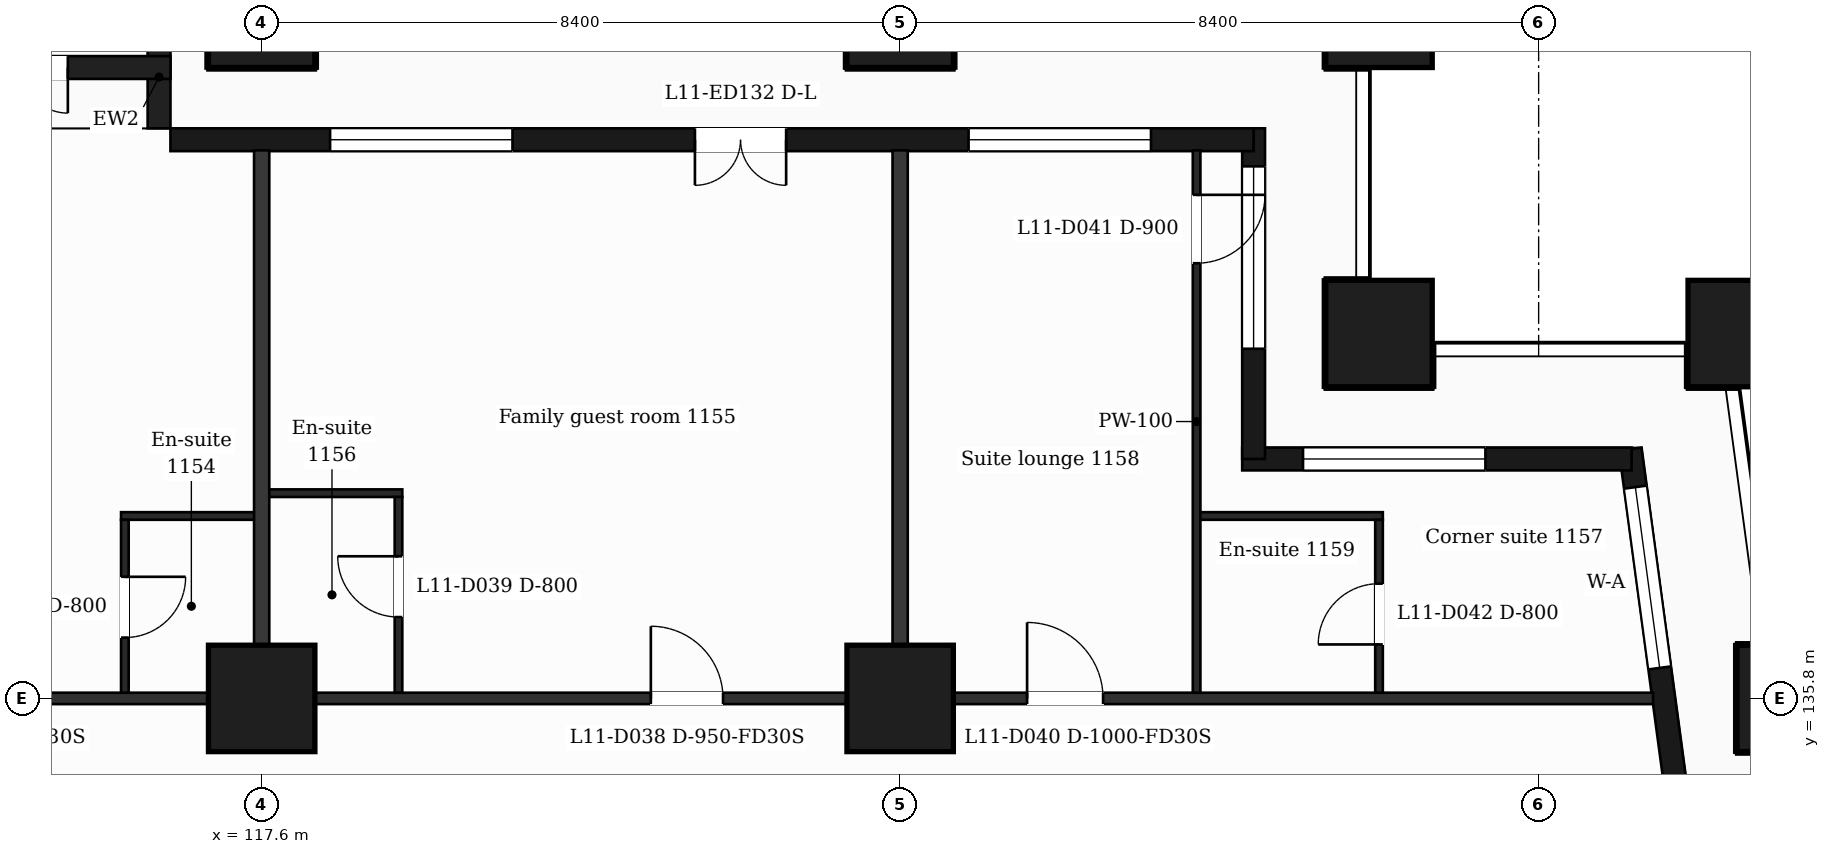
"""IFC4 building model, lengths in metres.
Left out: names, types, materials, properties, quantities, classifications, styles, units other than length and angle.
Written with IfcOpenShell. Run it as: python <this file> out.ifc"""

import sys

from ifc_helpers import new_model, si_unit, direction, frame, frame_2d, origin, origin_2d, place, context, subcontext, project, spatial, rectangle, extrude, element, fill, save


model = new_model("IFC4")
c1 = context("Model", 3, precision=1e-05, world=origin(), true_north=direction((0.0, 1.0)))
c2 = subcontext(c1, "Body", "Model", "MODEL_VIEW")
j1 = project(units=[si_unit("LENGTHUNIT", "METRE"), si_unit("PLANEANGLEUNIT", "RADIAN")], contexts=[c1])
p1 = place(None, origin())
s1 = spatial("IfcSite", under=j1, at=p1, CompositionType="ELEMENT")
p2 = place(p1, origin())
s2 = spatial("IfcBuilding", under=s1, at=p2, CompositionType="ELEMENT")
p3 = place(p2, frame((0.0, 0.0, 56.5)))
s3 = spatial("IfcBuildingStorey", under=s2, at=p3, CompositionType="ELEMENT", Elevation=56.5)
for number, where, z_axis, x_axis in (
    (1, (132.3, 140.6, 0.0), (0.0, 0.0, 1.0), (1.0, 0.0, 0.0)),
    (2, (137.065, 140.6, 0.0), (0.0, 0.0, 1.0), (1.0, 0.0, 0.0)),
    (3, (117.6, 135.8, 0.0), (0.0, 0.0, 1.0), (1.0, 0.0, 0.0)),
    (4, (126.0, 135.8, 0.0), (0.0, 0.0, 1.0), (1.0, 0.0, 0.0)),
    (5, (137.711, 135.8, 0.0), (0.0, 0.0, 1.0), (1.0, 0.0, 0.0)),
    (6, (117.6, 144.8, 0.0), (0.0, 0.0, 1.0), (1.0, 0.0, 0.0)),
    (7, (126.0, 144.8, 0.0), (0.0, 0.0, 1.0), (1.0, 0.0, 0.0)),
    (8, (132.3, 144.8, 0.0), (0.0, 0.0, 1.0), (1.0, 0.0, 0.0)),
):
    element("IfcColumn", number, at=place(p3, frame(where, z_axis=z_axis, x_axis=x_axis)), inside=s3, PredefinedType="COLUMN", context=c2, shape_type="SweptSolid", body=[
        extrude(rectangle(XDim=1.4, YDim=1.4, at=origin_2d()), origin(), (0.0, 0.0, 1.0), 3.5),
    ])
p4 = place(p3, frame((136.504, 132.4, 0.0), z_axis=(0.0, 0.0, 1.0), x_axis=(-0.133399697462, 0.99106231929, 0.0)))
e9 = element("IfcWall", 9, at=p4, inside=s3, PredefinedType="SOLIDWALL", context=c2, shape_type="SweptSolid", body=[
    extrude(rectangle(XDim=6.74, YDim=0.3, at=frame_2d((3.37, 0.0))), origin(), (0.0, 0.0, 1.0), 3.18),
])
p5 = place(p4, frame((1.115, 0.0, 0.0)))
e10 = element("IfcOpeningElement", 10, at=p5, cuts=e9, PredefinedType="OPENING", context=c2, shape_type="SweptSolid", body=[
    extrude(rectangle(XDim=1.2, YDim=2.4, at=frame_2d((0.6, 1.2))), frame((0.0, 0.16, 0.0), z_axis=(0.0, -1.0, 0.0), x_axis=(1.0, 0.0, 0.0)), (0.0, 0.0, 1.0), 0.32),
])
p6 = place(p4, frame((3.835, 0.0, 0.9)))
e11 = element("IfcOpeningElement", 11, at=p6, cuts=e9, PredefinedType="OPENING", context=c2, shape_type="SweptSolid", body=[
    extrude(rectangle(XDim=2.4, YDim=2.1, at=frame_2d((1.2, 1.05))), frame((0.0, 0.16, 0.0), z_axis=(0.0, -1.0, 0.0), x_axis=(1.0, 0.0, 0.0)), (0.0, 0.0, 1.0), 0.32),
])
p7 = place(p3, frame((135.623, 138.95, 0.0), z_axis=(0.0, 0.0, 1.0), x_axis=(-1.0, 0.0, 0.0)))
e12 = element("IfcWall", 12, at=p7, inside=s3, PredefinedType="SOLIDWALL", context=c2, shape_type="SweptSolid", body=[
    extrude(rectangle(XDim=5.123, YDim=0.3, at=frame_2d((2.561, 0.0))), origin(), (0.0, 0.0, 1.0), 3.18),
])
p8 = place(p7, frame((1.923, 0.0, 0.9)))
e13 = element("IfcOpeningElement", 13, at=p8, cuts=e12, PredefinedType="OPENING", context=c2, shape_type="SweptSolid", body=[
    extrude(rectangle(XDim=2.4, YDim=2.1, at=frame_2d((1.2, 1.05))), frame((0.0, 0.16, 0.0), z_axis=(0.0, -1.0, 0.0), x_axis=(1.0, 0.0, 0.0)), (0.0, 0.0, 1.0), 0.32),
])
p9 = place(p3, frame((130.65, 138.95, 0.0), z_axis=(0.0, 0.0, 1.0), x_axis=(0.0, 1.0, 0.0)))
e14 = element("IfcWall", 14, at=p9, inside=s3, PredefinedType="SOLIDWALL", context=c2, shape_type="SweptSolid", body=[
    extrude(rectangle(XDim=4.35, YDim=0.3, at=frame_2d((2.175, 0.0))), origin(), (0.0, 0.0, 1.0), 3.18),
])
p10 = place(p9, frame((1.45, 0.0, 0.9)))
e15 = element("IfcOpeningElement", 15, at=p10, cuts=e14, PredefinedType="OPENING", context=c2, shape_type="SweptSolid", body=[
    extrude(rectangle(XDim=2.4, YDim=2.1, at=frame_2d((1.2, 1.05))), frame((0.0, 0.16, 0.0), z_axis=(0.0, -1.0, 0.0), x_axis=(1.0, 0.0, 0.0)), (0.0, 0.0, 1.0), 0.32),
])
p11 = place(p3, frame((130.65, 143.15, 0.0), z_axis=(0.0, 0.0, 1.0), x_axis=(-1.0, 0.0, 0.0)))
e16 = element("IfcWall", 16, at=p11, inside=s3, PredefinedType="SOLIDWALL", context=c2, shape_type="SweptSolid", body=[
    extrude(rectangle(XDim=14.25, YDim=0.3, at=frame_2d((7.125, 0.0))), origin(), (0.0, 0.0, 1.0), 3.18),
])
p12 = place(p11, frame((1.35, 0.0, 0.9)))
e17 = element("IfcOpeningElement", 17, at=p12, cuts=e16, PredefinedType="OPENING", context=c2, shape_type="SweptSolid", body=[
    extrude(rectangle(XDim=2.4, YDim=2.1, at=frame_2d((1.2, 1.05))), frame((0.0, 0.16, 0.0), z_axis=(0.0, -1.0, 0.0), x_axis=(1.0, 0.0, 0.0)), (0.0, 0.0, 1.0), 0.32),
])
p13 = place(p11, frame((6.15, 0.0, 0.0)))
e18 = element("IfcOpeningElement", 18, at=p13, cuts=e16, PredefinedType="OPENING", context=c2, shape_type="SweptSolid", body=[
    extrude(rectangle(XDim=1.2, YDim=2.4, at=frame_2d((0.6, 1.2))), frame((0.0, 0.16, 0.0), z_axis=(0.0, -1.0, 0.0), x_axis=(1.0, 0.0, 0.0)), (0.0, 0.0, 1.0), 0.32),
])
p14 = place(p11, frame((9.75, 0.0, 0.9)))
e19 = element("IfcOpeningElement", 19, at=p14, cuts=e16, PredefinedType="OPENING", context=c2, shape_type="SweptSolid", body=[
    extrude(rectangle(XDim=2.4, YDim=2.1, at=frame_2d((1.2, 1.05))), frame((0.0, 0.16, 0.0), z_axis=(0.0, -1.0, 0.0), x_axis=(1.0, 0.0, 0.0)), (0.0, 0.0, 1.0), 0.32),
])
p15 = place(p3, frame((116.25, 143.3, 0.0), z_axis=(0.0, 0.0, 1.0), x_axis=(0.0, 1.0, 0.0)))
e20 = element("IfcWall", 20, at=p15, inside=s3, PredefinedType="SOLIDWALL", context=c2, shape_type="SweptSolid", body=[
    extrude(rectangle(XDim=1.35, YDim=0.3, at=frame_2d((0.675, 0.0))), origin(), (0.0, 0.0, 1.0), 3.18),
])
p16 = place(p3, frame((116.4, 144.1, 0.0), z_axis=(0.0, 0.0, 1.0), x_axis=(-1.0, 0.0, 0.0)))
e21 = element("IfcWall", 21, at=p16, inside=s3, PredefinedType="SOLIDWALL", context=c2, shape_type="SweptSolid", body=[
    extrude(rectangle(XDim=3.9, YDim=0.3, at=frame_2d((1.95, 0.0))), origin(), (0.0, 0.0, 1.0), 3.18),
])
p17 = place(p16, frame((1.35, 0.0, 0.0)))
e22 = element("IfcOpeningElement", 22, at=p17, cuts=e21, PredefinedType="OPENING", context=c2, shape_type="SweptSolid", body=[
    extrude(rectangle(XDim=1.2, YDim=2.4, at=frame_2d((0.6, 1.2))), frame((0.0, 0.16, 0.0), z_axis=(0.0, -1.0, 0.0), x_axis=(1.0, 0.0, 0.0)), (0.0, 0.0, 1.0), 0.32),
])
p18 = place(p3, frame((90.895, 135.8, 0.0), z_axis=(0.0, 0.0, 1.0), x_axis=(1.0, 0.0, 0.0)))
e23 = element("IfcWall", 23, at=p18, inside=s3, PredefinedType="PARTITIONING", context=c2, shape_type="SweptSolid", body=[
    extrude(rectangle(XDim=45.011, YDim=0.15, at=frame_2d((22.505, 0.0))), origin(), (0.0, 0.0, 1.0), 3.18),
])
p19 = place(p18, frame((7.675, 0.0, 0.0)))
e24 = element("IfcOpeningElement", 24, at=p19, cuts=e23, PredefinedType="OPENING", context=c2, shape_type="SweptSolid", body=[
    extrude(rectangle(XDim=1.0, YDim=2.1, at=frame_2d((0.5, 1.05))), frame((0.0, 0.085, 0.0), z_axis=(0.0, -1.0, 0.0), x_axis=(1.0, 0.0, 0.0)), (0.0, 0.0, 1.0), 0.17),
])
p20 = place(p18, frame((10.892, 0.0, 0.0)))
e25 = element("IfcOpeningElement", 25, at=p20, cuts=e23, PredefinedType="OPENING", context=c2, shape_type="SweptSolid", body=[
    extrude(rectangle(XDim=0.95, YDim=2.1, at=frame_2d((0.475, 1.05))), frame((0.0, 0.085, 0.0), z_axis=(0.0, -1.0, 0.0), x_axis=(1.0, 0.0, 0.0)), (0.0, 0.0, 1.0), 0.17),
])
p21 = place(p18, frame((16.442, 0.0, 0.0)))
e26 = element("IfcOpeningElement", 26, at=p21, cuts=e23, PredefinedType="OPENING", context=c2, shape_type="SweptSolid", body=[
    extrude(rectangle(XDim=0.95, YDim=2.1, at=frame_2d((0.475, 1.05))), frame((0.0, 0.085, 0.0), z_axis=(0.0, -1.0, 0.0), x_axis=(1.0, 0.0, 0.0)), (0.0, 0.0, 1.0), 0.17),
])
p22 = place(p18, frame((22.368, 0.0, 0.0)))
e27 = element("IfcOpeningElement", 27, at=p22, cuts=e23, PredefinedType="OPENING", context=c2, shape_type="SweptSolid", body=[
    extrude(rectangle(XDim=0.95, YDim=2.1, at=frame_2d((0.475, 1.05))), frame((0.0, 0.085, 0.0), z_axis=(0.0, -1.0, 0.0), x_axis=(1.0, 0.0, 0.0)), (0.0, 0.0, 1.0), 0.17),
])
p23 = place(p18, frame((31.825, 0.0, 0.0)))
e28 = element("IfcOpeningElement", 28, at=p23, cuts=e23, PredefinedType="OPENING", context=c2, shape_type="SweptSolid", body=[
    extrude(rectangle(XDim=0.95, YDim=2.1, at=frame_2d((0.475, 1.05))), frame((0.0, 0.085, 0.0), z_axis=(0.0, -1.0, 0.0), x_axis=(1.0, 0.0, 0.0)), (0.0, 0.0, 1.0), 0.17),
])
p24 = place(p18, frame((36.775, 0.0, 0.0)))
e29 = element("IfcOpeningElement", 29, at=p24, cuts=e23, PredefinedType="OPENING", context=c2, shape_type="SweptSolid", body=[
    extrude(rectangle(XDim=1.0, YDim=2.1, at=frame_2d((0.5, 1.05))), frame((0.0, 0.085, 0.0), z_axis=(0.0, -1.0, 0.0), x_axis=(1.0, 0.0, 0.0)), (0.0, 0.0, 1.0), 0.17),
])
p25 = place(p3, frame((115.75, 138.2, 0.0), z_axis=(0.0, 0.0, 1.0), x_axis=(1.0, 0.0, 0.0)))
e30 = element("IfcWall", 30, at=p25, inside=s3, PredefinedType="PARTITIONING", context=c2, shape_type="SweptSolid", body=[
    extrude(rectangle(XDim=1.85, YDim=0.1, at=frame_2d((0.925, 0.0))), origin(), (0.0, 0.0, 1.0), 3.18),
])
p26 = place(p3, frame((129.9, 138.2, 0.0), z_axis=(0.0, 0.0, 1.0), x_axis=(1.0, 0.0, 0.0)))
e31 = element("IfcWall", 31, at=p26, inside=s3, PredefinedType="PARTITIONING", context=c2, shape_type="SweptSolid", body=[
    extrude(rectangle(XDim=2.45, YDim=0.1, at=frame_2d((1.225, 0.0))), origin(), (0.0, 0.0, 1.0), 3.18),
])
p27 = place(p3, frame((117.6, 138.5, 0.0), z_axis=(0.0, 0.0, 1.0), x_axis=(1.0, 0.0, 0.0)))
e32 = element("IfcWall", 32, at=p27, inside=s3, PredefinedType="PARTITIONING", context=c2, shape_type="SweptSolid", body=[
    extrude(rectangle(XDim=1.85, YDim=0.1, at=frame_2d((0.925, 0.0))), origin(), (0.0, 0.0, 1.0), 3.18),
])
p28 = place(p3, frame((115.8, 135.875, 0.0), z_axis=(0.0, 0.0, 1.0), x_axis=(0.0, 1.0, 0.0)))
e33 = element("IfcWall", 33, at=p28, inside=s3, PredefinedType="PARTITIONING", context=c2, shape_type="SweptSolid", body=[
    extrude(rectangle(XDim=2.275, YDim=0.1, at=frame_2d((1.137, 0.0))), origin(), (0.0, 0.0, 1.0), 3.18),
])
p29 = place(p28, frame((0.725, 0.0, 0.0)))
e34 = element("IfcOpeningElement", 34, at=p29, cuts=e33, PredefinedType="OPENING", context=c2, shape_type="SweptSolid", body=[
    extrude(rectangle(XDim=0.8, YDim=2.1, at=frame_2d((0.4, 1.05))), frame((0.0, 0.06, 0.0), z_axis=(0.0, -1.0, 0.0), x_axis=(1.0, 0.0, 0.0)), (0.0, 0.0, 1.0), 0.12),
])
p30 = place(p3, frame((117.6, 135.875, 0.0), z_axis=(0.0, 0.0, 1.0), x_axis=(0.0, 1.0, 0.0)))
e35 = element("IfcWall", 35, at=p30, inside=s3, PredefinedType="PARTITIONING", context=c2, shape_type="SweptSolid", body=[
    extrude(rectangle(XDim=7.135, YDim=0.2, at=frame_2d((3.567, 0.0))), origin(), (0.0, 0.0, 1.0), 3.18),
])
p31 = place(p3, frame((119.4, 135.875, 0.0), z_axis=(0.0, 0.0, 1.0), x_axis=(0.0, 1.0, 0.0)))
e36 = element("IfcWall", 36, at=p31, inside=s3, PredefinedType="PARTITIONING", context=c2, shape_type="SweptSolid", body=[
    extrude(rectangle(XDim=2.575, YDim=0.1, at=frame_2d((1.288, 0.0))), origin(), (0.0, 0.0, 1.0), 3.18),
])
p32 = place(p31, frame((0.995, 0.0, 0.0)))
e37 = element("IfcOpeningElement", 37, at=p32, cuts=e36, PredefinedType="OPENING", context=c2, shape_type="SweptSolid", body=[
    extrude(rectangle(XDim=0.8, YDim=2.1, at=frame_2d((0.4, 1.05))), frame((0.0, 0.06, 0.0), z_axis=(0.0, -1.0, 0.0), x_axis=(1.0, 0.0, 0.0)), (0.0, 0.0, 1.0), 0.12),
])
p33 = place(p3, frame((126.0, 135.875, 0.0), z_axis=(0.0, 0.0, 1.0), x_axis=(0.0, 1.0, 0.0)))
e38 = element("IfcWall", 38, at=p33, inside=s3, PredefinedType="PARTITIONING", context=c2, shape_type="SweptSolid", body=[
    extrude(rectangle(XDim=7.135, YDim=0.2, at=frame_2d((3.567, 0.0))), origin(), (0.0, 0.0, 1.0), 3.18),
])
p34 = place(p3, frame((129.9, 135.875, 0.0), z_axis=(0.0, 0.0, 1.0), x_axis=(0.0, 1.0, 0.0)))
e39 = element("IfcWall", 39, at=p34, inside=s3, PredefinedType="PARTITIONING", context=c2, shape_type="SweptSolid", body=[
    extrude(rectangle(XDim=7.135, YDim=0.1, at=frame_2d((3.567, 0.0))), origin(), (0.0, 0.0, 1.0), 3.18),
])
p35 = place(p34, frame((5.65, 0.0, 0.0)))
e40 = element("IfcOpeningElement", 40, at=p35, cuts=e39, PredefinedType="OPENING", context=c2, shape_type="SweptSolid", body=[
    extrude(rectangle(XDim=0.9, YDim=2.1, at=frame_2d((0.45, 1.05))), frame((0.0, 0.06, 0.0), z_axis=(0.0, -1.0, 0.0), x_axis=(1.0, 0.0, 0.0)), (0.0, 0.0, 1.0), 0.12),
])
p36 = place(p3, frame((132.3, 135.875, 0.0), z_axis=(0.0, 0.0, 1.0), x_axis=(0.0, 1.0, 0.0)))
e41 = element("IfcWall", 41, at=p36, inside=s3, PredefinedType="PARTITIONING", context=c2, shape_type="SweptSolid", body=[
    extrude(rectangle(XDim=2.275, YDim=0.1, at=frame_2d((1.137, 0.0))), origin(), (0.0, 0.0, 1.0), 3.18),
])
p37 = place(p36, frame((0.635, 0.0, 0.0)))
e42 = element("IfcOpeningElement", 42, at=p37, cuts=e41, PredefinedType="OPENING", context=c2, shape_type="SweptSolid", body=[
    extrude(rectangle(XDim=0.8, YDim=2.1, at=frame_2d((0.4, 1.05))), frame((0.0, 0.06, 0.0), z_axis=(0.0, -1.0, 0.0), x_axis=(1.0, 0.0, 0.0)), (0.0, 0.0, 1.0), 0.12),
])
p38 = place(p6, origin())
e43 = element("IfcWindow", 43, at=p38, inside=s3, PartitioningType="SINGLE_PANEL", PredefinedType="WINDOW", context=c2, shape_type="SweptSolid", body=[
    extrude(rectangle(XDim=2.4, YDim=2.1, at=frame_2d((1.2, 1.05))), frame((0.0, 0.03, 0.0), z_axis=(0.0, -1.0, 0.0), x_axis=(1.0, 0.0, 0.0)), (0.0, 0.0, 1.0), 0.06),
])
fill(e11, e43)
p39 = place(p8, origin())
e44 = element("IfcWindow", 44, at=p39, inside=s3, PartitioningType="SINGLE_PANEL", PredefinedType="WINDOW", context=c2, shape_type="SweptSolid", body=[
    extrude(rectangle(XDim=2.4, YDim=2.1, at=frame_2d((1.2, 1.05))), frame((0.0, 0.03, 0.0), z_axis=(0.0, -1.0, 0.0), x_axis=(1.0, 0.0, 0.0)), (0.0, 0.0, 1.0), 0.06),
])
fill(e13, e44)
p40 = place(p10, origin())
e45 = element("IfcWindow", 45, at=p40, inside=s3, PartitioningType="SINGLE_PANEL", PredefinedType="WINDOW", context=c2, shape_type="SweptSolid", body=[
    extrude(rectangle(XDim=2.4, YDim=2.1, at=frame_2d((1.2, 1.05))), frame((0.0, 0.03, 0.0), z_axis=(0.0, -1.0, 0.0), x_axis=(1.0, 0.0, 0.0)), (0.0, 0.0, 1.0), 0.06),
])
fill(e15, e45)
p41 = place(p12, origin())
e46 = element("IfcWindow", 46, at=p41, inside=s3, PartitioningType="SINGLE_PANEL", PredefinedType="WINDOW", context=c2, shape_type="SweptSolid", body=[
    extrude(rectangle(XDim=2.4, YDim=2.1, at=frame_2d((1.2, 1.05))), frame((0.0, 0.03, 0.0), z_axis=(0.0, -1.0, 0.0), x_axis=(1.0, 0.0, 0.0)), (0.0, 0.0, 1.0), 0.06),
])
fill(e17, e46)
p42 = place(p13, origin())
e47 = element("IfcDoor", 47, at=p42, inside=s3, OperationType="DOUBLE_DOOR_SINGLE_SWING", PredefinedType="DOOR", context=c2, shape_type="SweptSolid", body=[
    extrude(rectangle(XDim=1.2, YDim=2.4, at=frame_2d((0.6, 1.2))), frame((0.0, 0.025, 0.0), z_axis=(0.0, -1.0, 0.0), x_axis=(1.0, 0.0, 0.0)), (0.0, 0.0, 1.0), 0.05),
])
fill(e18, e47)
p43 = place(p14, origin())
e48 = element("IfcWindow", 48, at=p43, inside=s3, PartitioningType="SINGLE_PANEL", PredefinedType="WINDOW", context=c2, shape_type="SweptSolid", body=[
    extrude(rectangle(XDim=2.4, YDim=2.1, at=frame_2d((1.2, 1.05))), frame((0.0, 0.03, 0.0), z_axis=(0.0, -1.0, 0.0), x_axis=(1.0, 0.0, 0.0)), (0.0, 0.0, 1.0), 0.06),
])
fill(e19, e48)
p44 = place(p17, origin())
e49 = element("IfcDoor", 49, at=p44, inside=s3, OperationType="DOUBLE_DOOR_SINGLE_SWING", PredefinedType="DOOR", context=c2, shape_type="SweptSolid", body=[
    extrude(rectangle(XDim=1.2, YDim=2.4, at=frame_2d((0.6, 1.2))), frame((0.0, 0.025, 0.0), z_axis=(0.0, -1.0, 0.0), x_axis=(1.0, 0.0, 0.0)), (0.0, 0.0, 1.0), 0.05),
])
fill(e22, e49)
p45 = place(p29, origin())
e50 = element("IfcDoor", 50, at=p45, inside=s3, OperationType="SINGLE_SWING_RIGHT", PredefinedType="DOOR", context=c2, shape_type="SweptSolid", body=[
    extrude(rectangle(XDim=0.8, YDim=2.1, at=frame_2d((0.4, 1.05))), frame((0.0, 0.025, 0.0), z_axis=(0.0, -1.0, 0.0), x_axis=(1.0, 0.0, 0.0)), (0.0, 0.0, 1.0), 0.05),
])
fill(e34, e50)
p46 = place(p23, origin())
e51 = element("IfcDoor", 51, at=p46, inside=s3, OperationType="SINGLE_SWING_LEFT", PredefinedType="DOOR", context=c2, shape_type="SweptSolid", body=[
    extrude(rectangle(XDim=0.95, YDim=2.1, at=frame_2d((0.475, 1.05))), frame((0.0, 0.025, 0.0), z_axis=(0.0, -1.0, 0.0), x_axis=(1.0, 0.0, 0.0)), (0.0, 0.0, 1.0), 0.05),
])
fill(e28, e51)
p47 = place(p32, origin())
e52 = element("IfcDoor", 52, at=p47, inside=s3, OperationType="SINGLE_SWING_RIGHT", PredefinedType="DOOR", context=c2, shape_type="SweptSolid", body=[
    extrude(rectangle(XDim=0.8, YDim=2.1, at=frame_2d((0.4, 1.05))), frame((0.0, 0.025, 0.0), z_axis=(0.0, -1.0, 0.0), x_axis=(1.0, 0.0, 0.0)), (0.0, 0.0, 1.0), 0.05),
])
fill(e37, e52)
p48 = place(p24, origin())
e53 = element("IfcDoor", 53, at=p48, inside=s3, OperationType="SINGLE_SWING_LEFT", PredefinedType="DOOR", context=c2, shape_type="SweptSolid", body=[
    extrude(rectangle(XDim=1.0, YDim=2.1, at=frame_2d((0.5, 1.05))), frame((0.0, 0.025, 0.0), z_axis=(0.0, -1.0, 0.0), x_axis=(1.0, 0.0, 0.0)), (0.0, 0.0, 1.0), 0.05),
])
fill(e29, e53)
p49 = place(p35, origin())
e54 = element("IfcDoor", 54, at=p49, inside=s3, OperationType="SINGLE_SWING_RIGHT", PredefinedType="DOOR", context=c2, shape_type="SweptSolid", body=[
    extrude(rectangle(XDim=0.9, YDim=2.1, at=frame_2d((0.45, 1.05))), frame((0.0, 0.025, 0.0), z_axis=(0.0, -1.0, 0.0), x_axis=(1.0, 0.0, 0.0)), (0.0, 0.0, 1.0), 0.05),
])
fill(e40, e54)
p50 = place(p37, origin())
e55 = element("IfcDoor", 55, at=p50, inside=s3, OperationType="SINGLE_SWING_LEFT", PredefinedType="DOOR", context=c2, shape_type="SweptSolid", body=[
    extrude(rectangle(XDim=0.8, YDim=2.1, at=frame_2d((0.4, 1.05))), frame((0.0, 0.025, 0.0), z_axis=(0.0, -1.0, 0.0), x_axis=(1.0, 0.0, 0.0)), (0.0, 0.0, 1.0), 0.05),
])
fill(e42, e55)
save(model, sys.argv[1])
